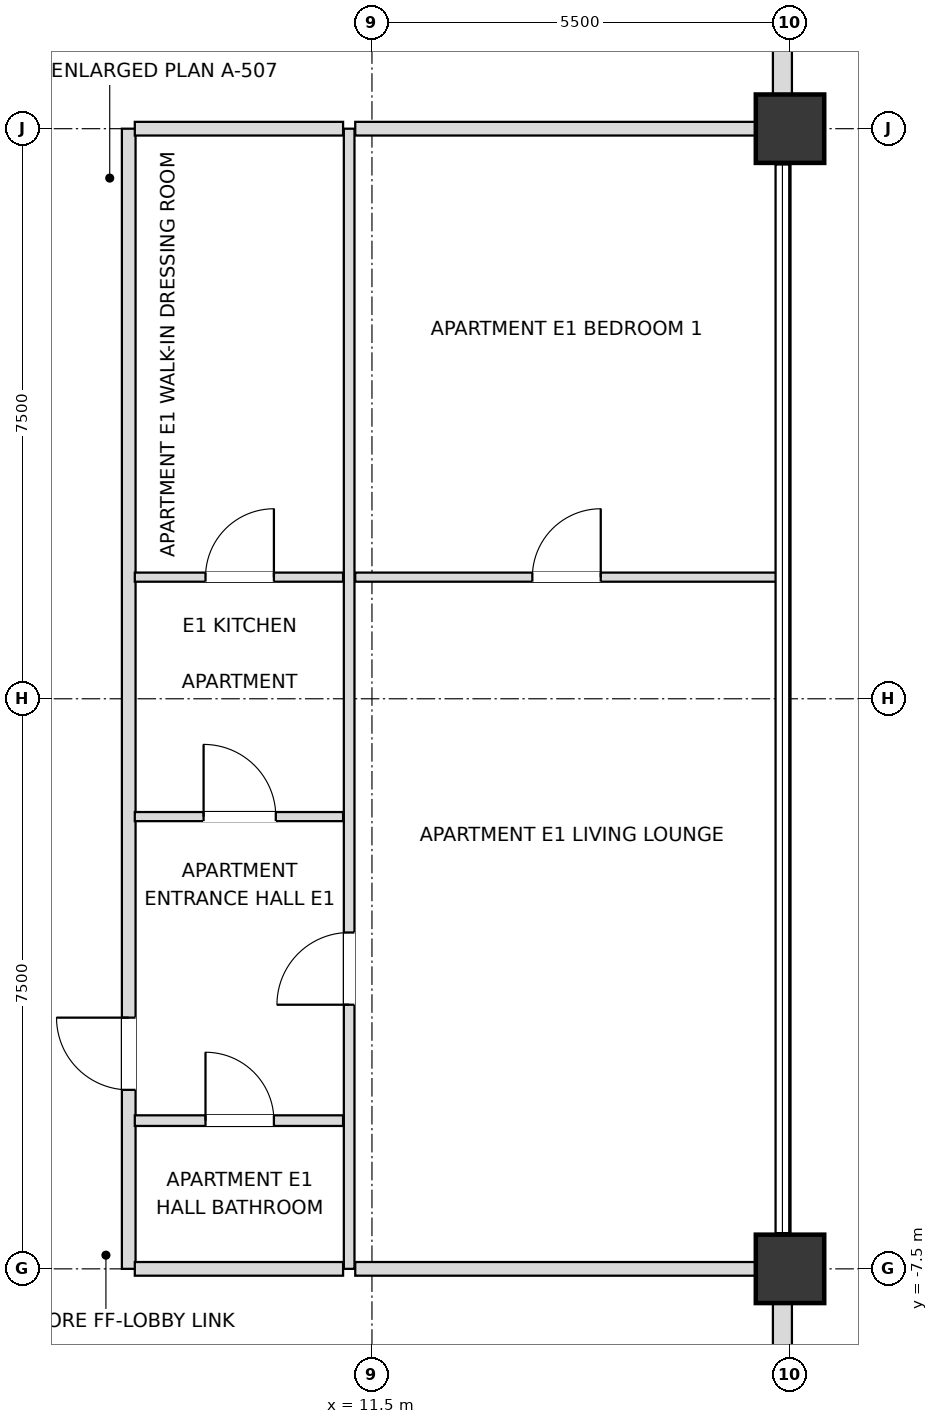
"""IFC4 building model, lengths in metres.
Left out: names, types, materials, properties, quantities, classifications, styles, units other than length and angle.
Written with IfcOpenShell. Run it as: python <this file> out.ifc"""

import sys

from ifc_helpers import new_model, si_unit, direction, frame, frame_2d, origin, origin_2d, place, context, subcontext, project, spatial, rectangle, extrude, element, fill, save


model = new_model("IFC4")
c1 = context("Model", 3, precision=1e-05, world=origin(), true_north=direction((0.0, 1.0)))
c2 = subcontext(c1, "Body", "Model", "MODEL_VIEW")
j1 = project(units=[si_unit("LENGTHUNIT", "METRE"), si_unit("PLANEANGLEUNIT", "RADIAN")], contexts=[c1])
p1 = place(None, origin())
s1 = spatial("IfcSite", under=j1, at=p1, CompositionType="ELEMENT")
p2 = place(p1, origin())
s2 = spatial("IfcBuilding", under=s1, at=p2, CompositionType="ELEMENT")
p3 = place(p2, frame((0.0, 0.0, 225.9)))
s3 = spatial("IfcBuildingStorey", under=s2, at=p3, CompositionType="ELEMENT", Elevation=225.9)
for number, where, z_axis, x_axis in (
    (1, (17.0, -7.5, 0.0), (0.0, 0.0, 1.0), (1.0, 0.0, 0.0)),
    (2, (17.0, 7.5, 0.0), (0.0, 0.0, 1.0), (1.0, 0.0, 0.0)),
):
    element("IfcColumn", number, at=place(p3, frame(where, z_axis=z_axis, x_axis=x_axis)), inside=s3, PredefinedType="USERDEFINED", context=c2, shape_type="SweptSolid", body=[
        extrude(rectangle(XDim=0.9, YDim=0.9, at=origin_2d()), origin(), (0.0, 0.0, 1.0), 3.6),
    ])
p4 = place(p3, frame((16.9, -12.555, 0.0), z_axis=(0.0, 0.0, 1.0), x_axis=(0.0, 1.0, 0.0)))
e3 = element("IfcWall", 3, at=p4, inside=s3, PredefinedType="SOLIDWALL", context=c2, shape_type="SweptSolid", body=[
    extrude(rectangle(XDim=4.61, YDim=0.25, at=frame_2d((2.305, 0.0))), origin(), (0.0, 0.0, 1.0), 2.748),
])
p5 = place(p4, frame((1.405, 0.0, 0.72)))
e4 = element("IfcOpeningElement", 4, at=p5, cuts=e3, PredefinedType="OPENING", context=c2, shape_type="SweptSolid", body=[
    extrude(rectangle(XDim=1.8, YDim=1.68, at=frame_2d((0.9, 0.84))), frame((0.0, 0.135, 0.0), z_axis=(0.0, -1.0, 0.0), x_axis=(1.0, 0.0, 0.0)), (0.0, 0.0, 1.0), 0.27),
])
p6 = place(p3, frame((16.9, 7.945, 0.0), z_axis=(0.0, 0.0, 1.0), x_axis=(0.0, 1.0, 0.0)))
e5 = element("IfcWall", 5, at=p6, inside=s3, PredefinedType="SOLIDWALL", context=c2, shape_type="SweptSolid", body=[
    extrude(rectangle(XDim=4.61, YDim=0.25, at=frame_2d((2.305, 0.0))), origin(), (0.0, 0.0, 1.0), 2.748),
])
p7 = place(p6, frame((1.405, 0.0, 0.72)))
e6 = element("IfcOpeningElement", 6, at=p7, cuts=e5, PredefinedType="OPENING", context=c2, shape_type="SweptSolid", body=[
    extrude(rectangle(XDim=1.8, YDim=1.68, at=frame_2d((0.9, 0.84))), frame((0.0, 0.135, 0.0), z_axis=(0.0, -1.0, 0.0), x_axis=(1.0, 0.0, 0.0)), (0.0, 0.0, 1.0), 0.27),
])
p8 = place(p3, frame((8.3, -7.5, 0.0), z_axis=(0.0, 0.0, 1.0), x_axis=(0.0, 1.0, 0.0)))
e7 = element("IfcWall", 7, at=p8, inside=s3, PredefinedType="PARTITIONING", context=c2, shape_type="SweptSolid", body=[
    extrude(rectangle(XDim=15.0, YDim=0.18, at=frame_2d((7.5, 0.0))), origin(), (0.0, 0.0, 1.0), 3.38),
])
p9 = place(p8, frame((2.355, 0.0, 0.0)))
e8 = element("IfcOpeningElement", 8, at=p9, cuts=e7, PredefinedType="OPENING", context=c2, shape_type="SweptSolid", body=[
    extrude(rectangle(XDim=0.95, YDim=2.15, at=frame_2d((0.475, 1.075))), frame((0.0, 0.1, 0.0), z_axis=(0.0, -1.0, 0.0), x_axis=(1.0, 0.0, 0.0)), (0.0, 0.0, 1.0), 0.2),
])
p10 = place(p3, frame((11.2, -7.5, 0.0), z_axis=(0.0, 0.0, 1.0), x_axis=(0.0, 1.0, 0.0)))
e9 = element("IfcWall", 9, at=p10, inside=s3, PredefinedType="PARTITIONING", context=c2, shape_type="SweptSolid", body=[
    extrude(rectangle(XDim=15.0, YDim=0.14, at=frame_2d((7.5, 0.0))), origin(), (0.0, 0.0, 1.0), 3.38),
])
p11 = place(p10, frame((3.475, 0.0, 0.0)))
e10 = element("IfcOpeningElement", 10, at=p11, cuts=e9, PredefinedType="OPENING", context=c2, shape_type="SweptSolid", body=[
    extrude(rectangle(XDim=0.95, YDim=2.1, at=frame_2d((0.475, 1.05))), frame((0.0, 0.08, 0.0), z_axis=(0.0, -1.0, 0.0), x_axis=(1.0, 0.0, 0.0)), (0.0, 0.0, 1.0), 0.16),
])
p12 = place(p3, frame((8.38, -7.5, 0.0), z_axis=(0.0, 0.0, 1.0), x_axis=(1.0, 0.0, 0.0)))
e11 = element("IfcWall", 11, at=p12, inside=s3, PredefinedType="PARTITIONING", context=c2, shape_type="SweptSolid", body=[
    extrude(rectangle(XDim=2.74, YDim=0.18, at=frame_2d((1.37, 0.0))), origin(), (0.0, 0.0, 1.0), 2.826),
])
p13 = place(p3, frame((11.28, -7.5, 0.0), z_axis=(0.0, 0.0, 1.0), x_axis=(1.0, 0.0, 0.0)))
e12 = element("IfcWall", 12, at=p13, inside=s3, PredefinedType="PARTITIONING", context=c2, shape_type="SweptSolid", body=[
    extrude(rectangle(XDim=5.62, YDim=0.18, at=frame_2d((2.81, 0.0))), origin(), (0.0, 0.0, 1.0), 2.826),
])
p14 = place(p3, frame((8.38, -5.55, 0.0), z_axis=(0.0, 0.0, 1.0), x_axis=(1.0, 0.0, 0.0)))
e13 = element("IfcWall", 13, at=p14, inside=s3, PredefinedType="PARTITIONING", context=c2, shape_type="SweptSolid", body=[
    extrude(rectangle(XDim=2.74, YDim=0.14, at=frame_2d((1.37, 0.0))), origin(), (0.0, 0.0, 1.0), 3.38),
])
p15 = place(p14, frame((0.93, 0.0, 0.0)))
e14 = element("IfcOpeningElement", 14, at=p15, cuts=e13, PredefinedType="OPENING", context=c2, shape_type="SweptSolid", body=[
    extrude(rectangle(XDim=0.9, YDim=2.1, at=frame_2d((0.45, 1.05))), frame((0.0, 0.08, 0.0), z_axis=(0.0, -1.0, 0.0), x_axis=(1.0, 0.0, 0.0)), (0.0, 0.0, 1.0), 0.16),
])
p16 = place(p3, frame((8.38, -1.55, 0.0), z_axis=(0.0, 0.0, 1.0), x_axis=(1.0, 0.0, 0.0)))
e15 = element("IfcWall", 15, at=p16, inside=s3, PredefinedType="PARTITIONING", context=c2, shape_type="SweptSolid", body=[
    extrude(rectangle(XDim=2.74, YDim=0.12, at=frame_2d((1.37, 0.0))), origin(), (0.0, 0.0, 1.0), 3.38),
])
p17 = place(p16, frame((0.905, 0.0, 0.0)))
e16 = element("IfcOpeningElement", 16, at=p17, cuts=e15, PredefinedType="OPENING", context=c2, shape_type="SweptSolid", body=[
    extrude(rectangle(XDim=0.95, YDim=2.1, at=frame_2d((0.475, 1.05))), frame((0.0, 0.07, 0.0), z_axis=(0.0, -1.0, 0.0), x_axis=(1.0, 0.0, 0.0)), (0.0, 0.0, 1.0), 0.14),
])
p18 = place(p3, frame((8.38, 1.6, 0.0), z_axis=(0.0, 0.0, 1.0), x_axis=(1.0, 0.0, 0.0)))
e17 = element("IfcWall", 17, at=p18, inside=s3, PredefinedType="PARTITIONING", context=c2, shape_type="SweptSolid", body=[
    extrude(rectangle(XDim=2.74, YDim=0.12, at=frame_2d((1.37, 0.0))), origin(), (0.0, 0.0, 1.0), 3.38),
])
p19 = place(p18, frame((0.93, 0.0, 0.0)))
e18 = element("IfcOpeningElement", 18, at=p19, cuts=e17, PredefinedType="OPENING", context=c2, shape_type="SweptSolid", body=[
    extrude(rectangle(XDim=0.9, YDim=2.1, at=frame_2d((0.45, 1.05))), frame((0.0, 0.07, 0.0), z_axis=(0.0, -1.0, 0.0), x_axis=(1.0, 0.0, 0.0)), (0.0, 0.0, 1.0), 0.14),
])
p20 = place(p3, frame((11.28, 1.6, 0.0), z_axis=(0.0, 0.0, 1.0), x_axis=(1.0, 0.0, 0.0)))
e19 = element("IfcWall", 19, at=p20, inside=s3, PredefinedType="PARTITIONING", context=c2, shape_type="SweptSolid", body=[
    extrude(rectangle(XDim=5.54, YDim=0.12, at=frame_2d((2.77, 0.0))), origin(), (0.0, 0.0, 1.0), 3.018),
])
p21 = place(p20, frame((2.33, 0.0, 0.0)))
e20 = element("IfcOpeningElement", 20, at=p21, cuts=e19, PredefinedType="OPENING", context=c2, shape_type="SweptSolid", body=[
    extrude(rectangle(XDim=0.9, YDim=2.1, at=frame_2d((0.45, 1.05))), frame((0.0, 0.07, 0.0), z_axis=(0.0, -1.0, 0.0), x_axis=(1.0, 0.0, 0.0)), (0.0, 0.0, 1.0), 0.14),
])
p22 = place(p3, frame((8.38, 7.5, 0.0), z_axis=(0.0, 0.0, 1.0), x_axis=(1.0, 0.0, 0.0)))
e21 = element("IfcWall", 21, at=p22, inside=s3, PredefinedType="PARTITIONING", context=c2, shape_type="SweptSolid", body=[
    extrude(rectangle(XDim=2.74, YDim=0.18, at=frame_2d((1.37, 0.0))), origin(), (0.0, 0.0, 1.0), 2.826),
])
p23 = place(p3, frame((11.28, 7.5, 0.0), z_axis=(0.0, 0.0, 1.0), x_axis=(1.0, 0.0, 0.0)))
e22 = element("IfcWall", 22, at=p23, inside=s3, PredefinedType="PARTITIONING", context=c2, shape_type="SweptSolid", body=[
    extrude(rectangle(XDim=5.62, YDim=0.18, at=frame_2d((2.81, 0.0))), origin(), (0.0, 0.0, 1.0), 2.826),
])
p24 = place(p15, origin())
e23 = element("IfcDoor", 23, at=p24, inside=s3, OperationType="SINGLE_SWING_LEFT", PredefinedType="DOOR", context=c2, shape_type="SweptSolid", body=[
    extrude(rectangle(XDim=0.9, YDim=2.1, at=frame_2d((0.45, 1.05))), frame((0.0, 0.025, 0.0), z_axis=(0.0, -1.0, 0.0), x_axis=(1.0, 0.0, 0.0)), (0.0, 0.0, 1.0), 0.05),
])
fill(e14, e23)
p25 = place(p9, origin())
e24 = element("IfcDoor", 24, at=p25, inside=s3, OperationType="SINGLE_SWING_RIGHT", PredefinedType="DOOR", context=c2, shape_type="SweptSolid", body=[
    extrude(rectangle(XDim=0.95, YDim=2.15, at=frame_2d((0.475, 1.075))), frame((0.0, 0.025, 0.0), z_axis=(0.0, -1.0, 0.0), x_axis=(1.0, 0.0, 0.0)), (0.0, 0.0, 1.0), 0.05),
])
fill(e8, e24)
p26 = place(p17, origin())
e25 = element("IfcDoor", 25, at=p26, inside=s3, OperationType="SINGLE_SWING_LEFT", PredefinedType="DOOR", context=c2, shape_type="SweptSolid", body=[
    extrude(rectangle(XDim=0.95, YDim=2.1, at=frame_2d((0.475, 1.05))), frame((0.0, 0.025, 0.0), z_axis=(0.0, -1.0, 0.0), x_axis=(1.0, 0.0, 0.0)), (0.0, 0.0, 1.0), 0.05),
])
fill(e16, e25)
p27 = place(p19, origin())
e26 = element("IfcDoor", 26, at=p27, inside=s3, OperationType="SINGLE_SWING_RIGHT", PredefinedType="DOOR", context=c2, shape_type="SweptSolid", body=[
    extrude(rectangle(XDim=0.9, YDim=2.1, at=frame_2d((0.45, 1.05))), frame((0.0, 0.025, 0.0), z_axis=(0.0, -1.0, 0.0), x_axis=(1.0, 0.0, 0.0)), (0.0, 0.0, 1.0), 0.05),
])
fill(e18, e26)
p28 = place(p11, origin())
e27 = element("IfcDoor", 27, at=p28, inside=s3, OperationType="SINGLE_SWING_LEFT", PredefinedType="DOOR", context=c2, shape_type="SweptSolid", body=[
    extrude(rectangle(XDim=0.95, YDim=2.1, at=frame_2d((0.475, 1.05))), frame((0.0, 0.025, 0.0), z_axis=(0.0, -1.0, 0.0), x_axis=(1.0, 0.0, 0.0)), (0.0, 0.0, 1.0), 0.05),
])
fill(e10, e27)
p29 = place(p21, origin())
e28 = element("IfcDoor", 28, at=p29, inside=s3, OperationType="SINGLE_SWING_RIGHT", PredefinedType="DOOR", context=c2, shape_type="SweptSolid", body=[
    extrude(rectangle(XDim=0.9, YDim=2.1, at=frame_2d((0.45, 1.05))), frame((0.0, 0.025, 0.0), z_axis=(0.0, -1.0, 0.0), x_axis=(1.0, 0.0, 0.0)), (0.0, 0.0, 1.0), 0.05),
])
fill(e20, e28)
save(model, sys.argv[1])
